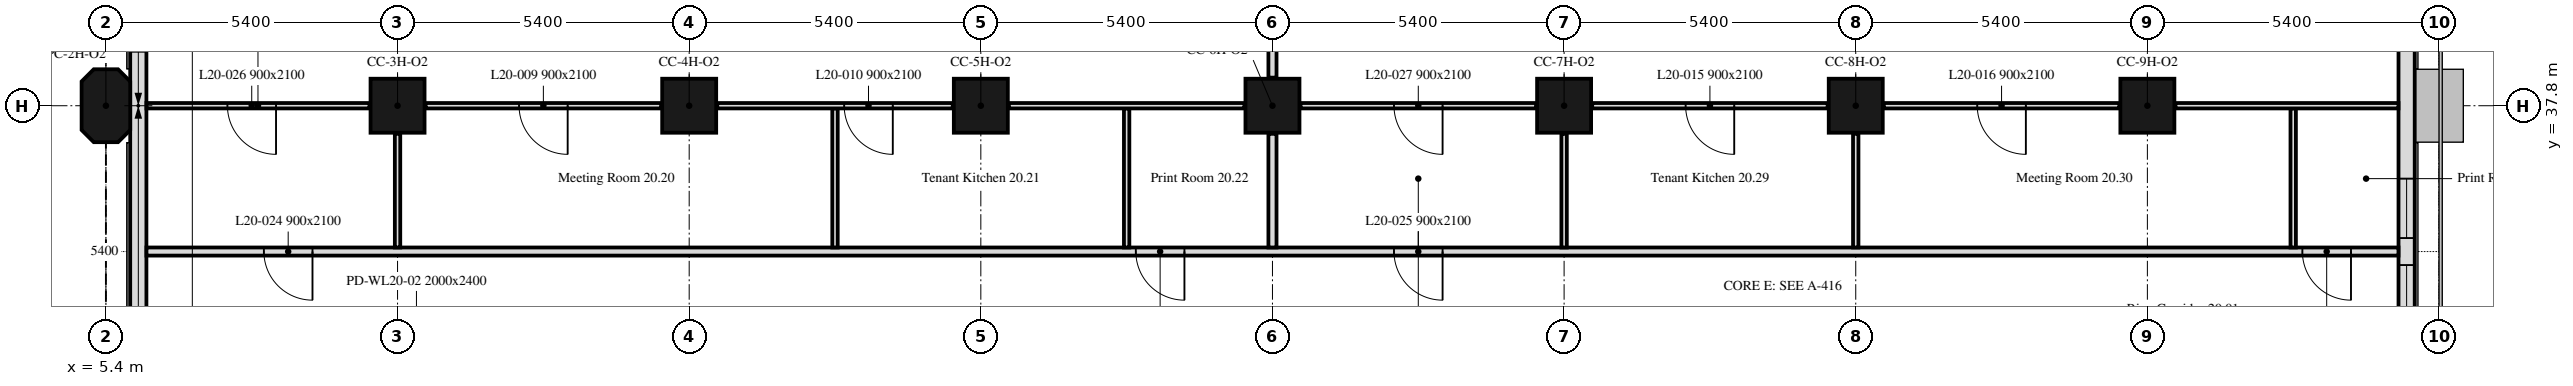
"""IFC4 building model, lengths in metres.
Left out: names, types, materials, properties, quantities, classifications, styles, units other than length and angle.
Written with IfcOpenShell. Run it as: python <this file> out.ifc"""

import sys

from ifc_helpers import new_model, si_unit, direction, frame, frame_2d, origin, origin_2d, place, context, subcontext, project, spatial, polyline, rectangle, outline, extrude, element, fill, save


model = new_model("IFC4")
c1 = context("Model", 3, precision=1e-05, world=origin(), true_north=direction((0.0, 1.0)))
c2 = subcontext(c1, "Body", "Model", "MODEL_VIEW")
j1 = project(units=[si_unit("LENGTHUNIT", "METRE"), si_unit("PLANEANGLEUNIT", "RADIAN")], contexts=[c1])
p1 = place(None, origin())
s1 = spatial("IfcSite", under=j1, at=p1, CompositionType="ELEMENT")
p2 = place(p1, origin())
s2 = spatial("IfcBuilding", under=s1, at=p2, CompositionType="ELEMENT")
p3 = place(p2, frame((0.0, 0.0, 87.8)))
s3 = spatial("IfcBuildingStorey", under=s2, at=p3, CompositionType="ELEMENT", Elevation=87.8)
p4 = place(p3, frame((5.4, 37.8, 0.0), z_axis=(0.0, 0.0, 1.0), x_axis=(0.0, 1.0, 0.0)))
e1 = element("IfcColumn", 1, at=p4, inside=s3, PredefinedType="COLUMN", context=c2, shape_type="SweptSolid", body=[
    extrude(outline(polyline([(-0.45, -0.45), (0.45, -0.45), (0.675, -0.225), (0.675, 0.225), (0.45, 0.45), (-0.45, 0.45), (-0.675, 0.225), (-0.675, -0.225), (-0.45, -0.45)])), origin(), (0.0, 0.0, 1.0), 3.5),
])
for number, where, z_axis, x_axis in (
    (2, (10.8, 37.8, 0.0), (0.0, 0.0, 1.0), (1.0, 0.0, 0.0)),
    (3, (16.2, 37.8, 0.0), (0.0, 0.0, 1.0), (1.0, 0.0, 0.0)),
    (4, (21.6, 37.8, 0.0), (0.0, 0.0, 1.0), (1.0, 0.0, 0.0)),
    (5, (27.0, 37.8, 0.0), (0.0, 0.0, 1.0), (1.0, 0.0, 0.0)),
    (6, (32.4, 37.8, 0.0), (0.0, 0.0, 1.0), (1.0, 0.0, 0.0)),
    (7, (37.8, 37.8, 0.0), (0.0, 0.0, 1.0), (1.0, 0.0, 0.0)),
    (8, (43.2, 37.8, 0.0), (0.0, 0.0, 1.0), (1.0, 0.0, 0.0)),
):
    element("IfcColumn", number, at=place(p3, frame(where, z_axis=z_axis, x_axis=x_axis)), inside=s3, PredefinedType="COLUMN", context=c2, shape_type="SweptSolid", body=[
        extrude(rectangle(XDim=1.0, YDim=1.0, at=origin_2d()), origin(), (0.0, 0.0, 1.0), 3.5),
    ])
p5 = place(p3, frame((48.0, 10.986, 0.0), z_axis=(0.0, 0.0, 1.0), x_axis=(0.0, 1.0, 0.0)))
e9 = element("IfcWall", 9, at=p5, inside=s3, PredefinedType="SOLIDWALL", context=c2, shape_type="SweptSolid", body=[
    extrude(rectangle(XDim=32.027, YDim=0.3, at=frame_2d((16.014, 0.0))), origin(), (0.0, 0.0, 1.0), 3.5),
])
p6 = place(p5, frame((1.164, 0.0, 0.9)))
e10 = element("IfcOpeningElement", 10, at=p6, cuts=e9, PredefinedType="OPENING", context=c2, shape_type="SweptSolid", body=[
    extrude(rectangle(XDim=1.1, YDim=1.7, at=frame_2d((0.55, 0.85))), frame((0.0, 0.16, 0.0), z_axis=(0.0, -1.0, 0.0), x_axis=(1.0, 0.0, 0.0)), (0.0, 0.0, 1.0), 0.32),
])
p7 = place(p5, frame((2.764, 0.0, 0.9)))
e11 = element("IfcOpeningElement", 11, at=p7, cuts=e9, PredefinedType="OPENING", context=c2, shape_type="SweptSolid", body=[
    extrude(rectangle(XDim=1.1, YDim=1.7, at=frame_2d((0.55, 0.85))), frame((0.0, 0.16, 0.0), z_axis=(0.0, -1.0, 0.0), x_axis=(1.0, 0.0, 0.0)), (0.0, 0.0, 1.0), 0.32),
])
p8 = place(p5, frame((11.614, 0.0, 0.9)))
e12 = element("IfcOpeningElement", 12, at=p8, cuts=e9, PredefinedType="OPENING", context=c2, shape_type="SweptSolid", body=[
    extrude(rectangle(XDim=3.4, YDim=1.7, at=frame_2d((1.7, 0.85))), frame((0.0, 0.16, 0.0), z_axis=(0.0, -1.0, 0.0), x_axis=(1.0, 0.0, 0.0)), (0.0, 0.0, 1.0), 0.32),
])
p9 = place(p5, frame((22.764, 0.0, 0.9)))
e13 = element("IfcOpeningElement", 13, at=p9, cuts=e9, PredefinedType="OPENING", context=c2, shape_type="SweptSolid", body=[
    extrude(rectangle(XDim=1.1, YDim=1.7, at=frame_2d((0.55, 0.85))), frame((0.0, 0.16, 0.0), z_axis=(0.0, -1.0, 0.0), x_axis=(1.0, 0.0, 0.0)), (0.0, 0.0, 1.0), 0.32),
])
p10 = place(p5, frame((24.364, 0.0, 0.9)))
e14 = element("IfcOpeningElement", 14, at=p10, cuts=e9, PredefinedType="OPENING", context=c2, shape_type="SweptSolid", body=[
    extrude(rectangle(XDim=1.1, YDim=1.7, at=frame_2d((0.55, 0.85))), frame((0.0, 0.16, 0.0), z_axis=(0.0, -1.0, 0.0), x_axis=(1.0, 0.0, 0.0)), (0.0, 0.0, 1.0), 0.32),
])
p11 = place(p3, frame((6.0, 43.014, 0.0), z_axis=(0.0, 0.0, 1.0), x_axis=(0.0, -1.0, 0.0)))
e15 = element("IfcWall", 15, at=p11, inside=s3, PredefinedType="SOLIDWALL", context=c2, shape_type="SweptSolid", body=[
    extrude(rectangle(XDim=10.614, YDim=0.3, at=frame_2d((5.307, 0.0))), origin(), (0.0, 0.0, 1.0), 3.5),
])
p12 = place(p11, frame((0.814, 0.0, 0.9)))
e16 = element("IfcOpeningElement", 16, at=p12, cuts=e15, PredefinedType="OPENING", context=c2, shape_type="SweptSolid", body=[
    extrude(rectangle(XDim=3.4, YDim=1.7, at=frame_2d((1.7, 0.85))), frame((0.0, 0.16, 0.0), z_axis=(0.0, -1.0, 0.0), x_axis=(1.0, 0.0, 0.0)), (0.0, 0.0, 1.0), 0.32),
])
p13 = place(p3, frame((47.849, 35.1, 0.0), z_axis=(0.0, 0.0, 1.0), x_axis=(-1.0, 0.0, 0.0)))
e17 = element("IfcWall", 17, at=p13, inside=s3, PredefinedType="PARTITIONING", context=c2, shape_type="SweptSolid", body=[
    extrude(rectangle(XDim=41.698, YDim=0.15, at=frame_2d((20.849, 0.0))), origin(), (0.0, 0.0, 1.0), 2.75),
])
p14 = place(p13, frame((22.479, 0.0, 0.0)))
e18 = element("IfcOpeningElement", 18, at=p14, cuts=e17, PredefinedType="OPENING", context=c2, shape_type="SweptSolid", body=[
    extrude(rectangle(XDim=0.9, YDim=2.1, at=frame_2d((0.45, 1.05))), frame((0.0, 0.075, 0.0), z_axis=(0.0, -1.0, 0.0), x_axis=(1.0, 0.0, 0.0)), (0.0, 0.0, 1.0), 0.15),
])
p15 = place(p13, frame((0.879, 0.0, 0.0)))
e19 = element("IfcOpeningElement", 19, at=p15, cuts=e17, PredefinedType="OPENING", context=c2, shape_type="SweptSolid", body=[
    extrude(rectangle(XDim=0.9, YDim=2.1, at=frame_2d((0.45, 1.05))), frame((0.0, 0.075, 0.0), z_axis=(0.0, -1.0, 0.0), x_axis=(1.0, 0.0, 0.0)), (0.0, 0.0, 1.0), 0.15),
])
p16 = place(p13, frame((38.624, 0.0, 0.0)))
e20 = element("IfcOpeningElement", 20, at=p16, cuts=e17, PredefinedType="OPENING", context=c2, shape_type="SweptSolid", body=[
    extrude(rectangle(XDim=0.9, YDim=2.1, at=frame_2d((0.45, 1.05))), frame((0.0, 0.075, 0.0), z_axis=(0.0, -1.0, 0.0), x_axis=(1.0, 0.0, 0.0)), (0.0, 0.0, 1.0), 0.15),
])
p17 = place(p13, frame((17.699, 0.0, 0.0)))
e21 = element("IfcOpeningElement", 21, at=p17, cuts=e17, PredefinedType="OPENING", context=c2, shape_type="SweptSolid", body=[
    extrude(rectangle(XDim=0.9, YDim=2.1, at=frame_2d((0.45, 1.05))), frame((0.0, 0.075, 0.0), z_axis=(0.0, -1.0, 0.0), x_axis=(1.0, 0.0, 0.0)), (0.0, 0.0, 1.0), 0.15),
])
p18 = place(p3, frame((10.28, 37.8, 0.0), z_axis=(0.0, 0.0, 1.0), x_axis=(-1.0, 0.0, 0.0)))
e22 = element("IfcWall", 22, at=p18, inside=s3, PredefinedType="PARTITIONING", context=c2, shape_type="SweptSolid", body=[
    extrude(rectangle(XDim=4.129, YDim=0.1, at=frame_2d((2.064, 0.0))), origin(), (0.0, 0.0, 1.0), 3.5),
])
p19 = place(p18, frame((1.73, 0.0, 0.0)))
e23 = element("IfcOpeningElement", 23, at=p19, cuts=e22, PredefinedType="OPENING", context=c2, shape_type="SweptSolid", body=[
    extrude(rectangle(XDim=0.9, YDim=2.1, at=frame_2d((0.45, 1.05))), frame((0.0, 0.05, 0.0), z_axis=(0.0, -1.0, 0.0), x_axis=(1.0, 0.0, 0.0)), (0.0, 0.0, 1.0), 0.1),
])
p20 = place(p3, frame((10.8, 35.175, 0.0), z_axis=(0.0, 0.0, 1.0), x_axis=(0.0, 1.0, 0.0)))
e24 = element("IfcWall", 24, at=p20, inside=s3, PredefinedType="PARTITIONING", context=c2, shape_type="SweptSolid", body=[
    extrude(rectangle(XDim=2.105, YDim=0.1, at=frame_2d((1.052, 0.0))), origin(), (0.0, 0.0, 1.0), 3.5),
])
p21 = place(p3, frame((18.9, 35.175, 0.0), z_axis=(0.0, 0.0, 1.0), x_axis=(0.0, 1.0, 0.0)))
e25 = element("IfcWall", 25, at=p21, inside=s3, PredefinedType="PARTITIONING", context=c2, shape_type="SweptSolid", body=[
    extrude(rectangle(XDim=2.575, YDim=0.1, at=frame_2d((1.288, 0.0))), origin(), (0.0, 0.0, 1.0), 3.5),
])
p22 = place(p3, frame((15.68, 37.8, 0.0), z_axis=(0.0, 0.0, 1.0), x_axis=(-1.0, 0.0, 0.0)))
e26 = element("IfcWall", 26, at=p22, inside=s3, PredefinedType="PARTITIONING", context=c2, shape_type="SweptSolid", body=[
    extrude(rectangle(XDim=4.36, YDim=0.1, at=frame_2d((2.18, 0.0))), origin(), (0.0, 0.0, 1.0), 3.5),
])
p23 = place(p22, frame((1.73, 0.0, 0.0)))
e27 = element("IfcOpeningElement", 27, at=p23, cuts=e26, PredefinedType="OPENING", context=c2, shape_type="SweptSolid", body=[
    extrude(rectangle(XDim=0.9, YDim=2.1, at=frame_2d((0.45, 1.05))), frame((0.0, 0.05, 0.0), z_axis=(0.0, -1.0, 0.0), x_axis=(1.0, 0.0, 0.0)), (0.0, 0.0, 1.0), 0.1),
])
p24 = place(p3, frame((24.3, 35.175, 0.0), z_axis=(0.0, 0.0, 1.0), x_axis=(0.0, 1.0, 0.0)))
e28 = element("IfcWall", 28, at=p24, inside=s3, PredefinedType="PARTITIONING", context=c2, shape_type="SweptSolid", body=[
    extrude(rectangle(XDim=2.575, YDim=0.1, at=frame_2d((1.288, 0.0))), origin(), (0.0, 0.0, 1.0), 3.5),
])
p25 = place(p3, frame((21.08, 37.8, 0.0), z_axis=(0.0, 0.0, 1.0), x_axis=(-1.0, 0.0, 0.0)))
e29 = element("IfcWall", 29, at=p25, inside=s3, PredefinedType="PARTITIONING", context=c2, shape_type="SweptSolid", body=[
    extrude(rectangle(XDim=4.36, YDim=0.1, at=frame_2d((2.18, 0.0))), origin(), (0.0, 0.0, 1.0), 3.5),
])
p26 = place(p25, frame((1.11, 0.0, 0.0)))
e30 = element("IfcOpeningElement", 30, at=p26, cuts=e29, PredefinedType="OPENING", context=c2, shape_type="SweptSolid", body=[
    extrude(rectangle(XDim=0.9, YDim=2.1, at=frame_2d((0.45, 1.05))), frame((0.0, 0.05, 0.0), z_axis=(0.0, -1.0, 0.0), x_axis=(1.0, 0.0, 0.0)), (0.0, 0.0, 1.0), 0.1),
])
p27 = place(p3, frame((27.0, 35.175, 0.0), z_axis=(0.0, 0.0, 1.0), x_axis=(0.0, 1.0, 0.0)))
e31 = element("IfcWall", 31, at=p27, inside=s3, PredefinedType="PARTITIONING", context=c2, shape_type="SweptSolid", body=[
    extrude(rectangle(XDim=2.105, YDim=0.15, at=frame_2d((1.052, 0.0))), origin(), (0.0, 0.0, 1.0), 2.75),
])
p28 = place(p3, frame((26.48, 37.8, 0.0), z_axis=(0.0, 0.0, 1.0), x_axis=(-1.0, 0.0, 0.0)))
e32 = element("IfcWall", 32, at=p28, inside=s3, PredefinedType="PARTITIONING", context=c2, shape_type="SweptSolid", body=[
    extrude(rectangle(XDim=4.36, YDim=0.1, at=frame_2d((2.18, 0.0))), origin(), (0.0, 0.0, 1.0), 3.5),
])
p29 = place(p3, frame((27.0, 38.32, 0.0), z_axis=(0.0, 0.0, 1.0), x_axis=(0.0, 1.0, 0.0)))
e33 = element("IfcWall", 33, at=p29, inside=s3, PredefinedType="PARTITIONING", context=c2, shape_type="SweptSolid", body=[
    extrude(rectangle(XDim=4.36, YDim=0.15, at=frame_2d((2.18, 0.0))), origin(), (0.0, 0.0, 1.0), 2.75),
])
p30 = place(p3, frame((32.4, 35.175, 0.0), z_axis=(0.0, 0.0, 1.0), x_axis=(0.0, 1.0, 0.0)))
e34 = element("IfcWall", 34, at=p30, inside=s3, PredefinedType="PARTITIONING", context=c2, shape_type="SweptSolid", body=[
    extrude(rectangle(XDim=2.105, YDim=0.1, at=frame_2d((1.052, 0.0))), origin(), (0.0, 0.0, 1.0), 2.75),
])
p31 = place(p3, frame((31.88, 37.8, 0.0), z_axis=(0.0, 0.0, 1.0), x_axis=(-1.0, 0.0, 0.0)))
e35 = element("IfcWall", 35, at=p31, inside=s3, PredefinedType="PARTITIONING", context=c2, shape_type="SweptSolid", body=[
    extrude(rectangle(XDim=4.36, YDim=0.1, at=frame_2d((2.18, 0.0))), origin(), (0.0, 0.0, 1.0), 3.5),
])
p32 = place(p31, frame((1.73, 0.0, 0.0)))
e36 = element("IfcOpeningElement", 36, at=p32, cuts=e35, PredefinedType="OPENING", context=c2, shape_type="SweptSolid", body=[
    extrude(rectangle(XDim=0.9, YDim=2.1, at=frame_2d((0.45, 1.05))), frame((0.0, 0.05, 0.0), z_axis=(0.0, -1.0, 0.0), x_axis=(1.0, 0.0, 0.0)), (0.0, 0.0, 1.0), 0.1),
])
p33 = place(p3, frame((37.8, 35.175, 0.0), z_axis=(0.0, 0.0, 1.0), x_axis=(0.0, 1.0, 0.0)))
e37 = element("IfcWall", 37, at=p33, inside=s3, PredefinedType="PARTITIONING", context=c2, shape_type="SweptSolid", body=[
    extrude(rectangle(XDim=2.105, YDim=0.1, at=frame_2d((1.052, 0.0))), origin(), (0.0, 0.0, 1.0), 2.75),
])
p34 = place(p3, frame((37.28, 37.8, 0.0), z_axis=(0.0, 0.0, 1.0), x_axis=(-1.0, 0.0, 0.0)))
e38 = element("IfcWall", 38, at=p34, inside=s3, PredefinedType="PARTITIONING", context=c2, shape_type="SweptSolid", body=[
    extrude(rectangle(XDim=4.36, YDim=0.1, at=frame_2d((2.18, 0.0))), origin(), (0.0, 0.0, 1.0), 2.75),
])
p35 = place(p34, frame((1.73, 0.0, 0.0)))
e39 = element("IfcOpeningElement", 39, at=p35, cuts=e38, PredefinedType="OPENING", context=c2, shape_type="SweptSolid", body=[
    extrude(rectangle(XDim=0.9, YDim=2.1, at=frame_2d((0.45, 1.05))), frame((0.0, 0.05, 0.0), z_axis=(0.0, -1.0, 0.0), x_axis=(1.0, 0.0, 0.0)), (0.0, 0.0, 1.0), 0.1),
])
p36 = place(p3, frame((45.9, 35.175, 0.0), z_axis=(0.0, 0.0, 1.0), x_axis=(0.0, 1.0, 0.0)))
e40 = element("IfcWall", 40, at=p36, inside=s3, PredefinedType="PARTITIONING", context=c2, shape_type="SweptSolid", body=[
    extrude(rectangle(XDim=2.575, YDim=0.1, at=frame_2d((1.288, 0.0))), origin(), (0.0, 0.0, 1.0), 3.5),
])
p37 = place(p3, frame((42.68, 37.8, 0.0), z_axis=(0.0, 0.0, 1.0), x_axis=(-1.0, 0.0, 0.0)))
e41 = element("IfcWall", 41, at=p37, inside=s3, PredefinedType="PARTITIONING", context=c2, shape_type="SweptSolid", body=[
    extrude(rectangle(XDim=4.36, YDim=0.1, at=frame_2d((2.18, 0.0))), origin(), (0.0, 0.0, 1.0), 2.75),
])
p38 = place(p37, frame((1.73, 0.0, 0.0)))
e42 = element("IfcOpeningElement", 42, at=p38, cuts=e41, PredefinedType="OPENING", context=c2, shape_type="SweptSolid", body=[
    extrude(rectangle(XDim=0.9, YDim=2.1, at=frame_2d((0.45, 1.05))), frame((0.0, 0.05, 0.0), z_axis=(0.0, -1.0, 0.0), x_axis=(1.0, 0.0, 0.0)), (0.0, 0.0, 1.0), 0.1),
])
p39 = place(p3, frame((47.849, 37.8, 0.0), z_axis=(0.0, 0.0, 1.0), x_axis=(-1.0, 0.0, 0.0)))
e43 = element("IfcWall", 43, at=p39, inside=s3, PredefinedType="PARTITIONING", context=c2, shape_type="SweptSolid", body=[
    extrude(rectangle(XDim=4.129, YDim=0.1, at=frame_2d((2.064, 0.0))), origin(), (0.0, 0.0, 1.0), 2.75),
])
p40 = place(p9, origin())
e44 = element("IfcWindow", 44, at=p40, inside=s3, PartitioningType="SINGLE_PANEL", PredefinedType="WINDOW", context=c2, shape_type="SweptSolid", body=[
    extrude(rectangle(XDim=1.1, YDim=1.7, at=frame_2d((0.55, 0.85))), frame((0.0, 0.03, 0.0), z_axis=(0.0, -1.0, 0.0), x_axis=(1.0, 0.0, 0.0)), (0.0, 0.0, 1.0), 0.06),
])
fill(e13, e44)
p41 = place(p10, origin())
e45 = element("IfcWindow", 45, at=p41, inside=s3, PartitioningType="SINGLE_PANEL", PredefinedType="WINDOW", context=c2, shape_type="SweptSolid", body=[
    extrude(rectangle(XDim=1.1, YDim=1.7, at=frame_2d((0.55, 0.85))), frame((0.0, 0.03, 0.0), z_axis=(0.0, -1.0, 0.0), x_axis=(1.0, 0.0, 0.0)), (0.0, 0.0, 1.0), 0.06),
])
fill(e14, e45)
p42 = place(p14, origin())
e46 = element("IfcDoor", 46, at=p42, inside=s3, OperationType="SINGLE_SWING_RIGHT", PredefinedType="DOOR", context=c2, shape_type="SweptSolid", body=[
    extrude(rectangle(XDim=0.9, YDim=2.1, at=frame_2d((0.45, 1.05))), frame((0.0, 0.025, 0.0), z_axis=(0.0, -1.0, 0.0), x_axis=(1.0, 0.0, 0.0)), (0.0, 0.0, 1.0), 0.05),
])
fill(e18, e46)
p43 = place(p15, origin())
e47 = element("IfcDoor", 47, at=p43, inside=s3, OperationType="SINGLE_SWING_RIGHT", PredefinedType="DOOR", context=c2, shape_type="SweptSolid", body=[
    extrude(rectangle(XDim=0.9, YDim=2.1, at=frame_2d((0.45, 1.05))), frame((0.0, 0.025, 0.0), z_axis=(0.0, -1.0, 0.0), x_axis=(1.0, 0.0, 0.0)), (0.0, 0.0, 1.0), 0.05),
])
fill(e19, e47)
p44 = place(p23, origin())
e48 = element("IfcDoor", 48, at=p44, inside=s3, OperationType="SINGLE_SWING_RIGHT", PredefinedType="DOOR", context=c2, shape_type="SweptSolid", body=[
    extrude(rectangle(XDim=0.9, YDim=2.1, at=frame_2d((0.45, 1.05))), frame((0.0, 0.025, 0.0), z_axis=(0.0, -1.0, 0.0), x_axis=(1.0, 0.0, 0.0)), (0.0, 0.0, 1.0), 0.05),
])
fill(e27, e48)
p45 = place(p26, origin())
e49 = element("IfcDoor", 49, at=p45, inside=s3, OperationType="SINGLE_SWING_RIGHT", PredefinedType="DOOR", context=c2, shape_type="SweptSolid", body=[
    extrude(rectangle(XDim=0.9, YDim=2.1, at=frame_2d((0.45, 1.05))), frame((0.0, 0.025, 0.0), z_axis=(0.0, -1.0, 0.0), x_axis=(1.0, 0.0, 0.0)), (0.0, 0.0, 1.0), 0.05),
])
fill(e30, e49)
p46 = place(p35, origin())
e50 = element("IfcDoor", 50, at=p46, inside=s3, OperationType="SINGLE_SWING_LEFT", PredefinedType="DOOR", context=c2, shape_type="SweptSolid", body=[
    extrude(rectangle(XDim=0.9, YDim=2.1, at=frame_2d((0.45, 1.05))), frame((0.0, 0.025, 0.0), z_axis=(0.0, -1.0, 0.0), x_axis=(1.0, 0.0, 0.0)), (0.0, 0.0, 1.0), 0.05),
])
fill(e39, e50)
p47 = place(p38, origin())
e51 = element("IfcDoor", 51, at=p47, inside=s3, OperationType="SINGLE_SWING_LEFT", PredefinedType="DOOR", context=c2, shape_type="SweptSolid", body=[
    extrude(rectangle(XDim=0.9, YDim=2.1, at=frame_2d((0.45, 1.05))), frame((0.0, 0.025, 0.0), z_axis=(0.0, -1.0, 0.0), x_axis=(1.0, 0.0, 0.0)), (0.0, 0.0, 1.0), 0.05),
])
fill(e42, e51)
p48 = place(p16, origin())
e52 = element("IfcDoor", 52, at=p48, inside=s3, OperationType="SINGLE_SWING_RIGHT", PredefinedType="DOOR", context=c2, shape_type="SweptSolid", body=[
    extrude(rectangle(XDim=0.9, YDim=2.1, at=frame_2d((0.45, 1.05))), frame((0.0, 0.025, 0.0), z_axis=(0.0, -1.0, 0.0), x_axis=(1.0, 0.0, 0.0)), (0.0, 0.0, 1.0), 0.05),
])
fill(e20, e52)
p49 = place(p17, origin())
e53 = element("IfcDoor", 53, at=p49, inside=s3, OperationType="SINGLE_SWING_RIGHT", PredefinedType="DOOR", context=c2, shape_type="SweptSolid", body=[
    extrude(rectangle(XDim=0.9, YDim=2.1, at=frame_2d((0.45, 1.05))), frame((0.0, 0.025, 0.0), z_axis=(0.0, -1.0, 0.0), x_axis=(1.0, 0.0, 0.0)), (0.0, 0.0, 1.0), 0.05),
])
fill(e21, e53)
p50 = place(p19, origin())
e54 = element("IfcDoor", 54, at=p50, inside=s3, OperationType="SINGLE_SWING_LEFT", PredefinedType="DOOR", context=c2, shape_type="SweptSolid", body=[
    extrude(rectangle(XDim=0.9, YDim=2.1, at=frame_2d((0.45, 1.05))), frame((0.0, 0.025, 0.0), z_axis=(0.0, -1.0, 0.0), x_axis=(1.0, 0.0, 0.0)), (0.0, 0.0, 1.0), 0.05),
])
fill(e23, e54)
p51 = place(p32, origin())
e55 = element("IfcDoor", 55, at=p51, inside=s3, OperationType="SINGLE_SWING_RIGHT", PredefinedType="DOOR", context=c2, shape_type="SweptSolid", body=[
    extrude(rectangle(XDim=0.9, YDim=2.1, at=frame_2d((0.45, 1.05))), frame((0.0, 0.025, 0.0), z_axis=(0.0, -1.0, 0.0), x_axis=(1.0, 0.0, 0.0)), (0.0, 0.0, 1.0), 0.05),
])
fill(e36, e55)
save(model, sys.argv[1])
